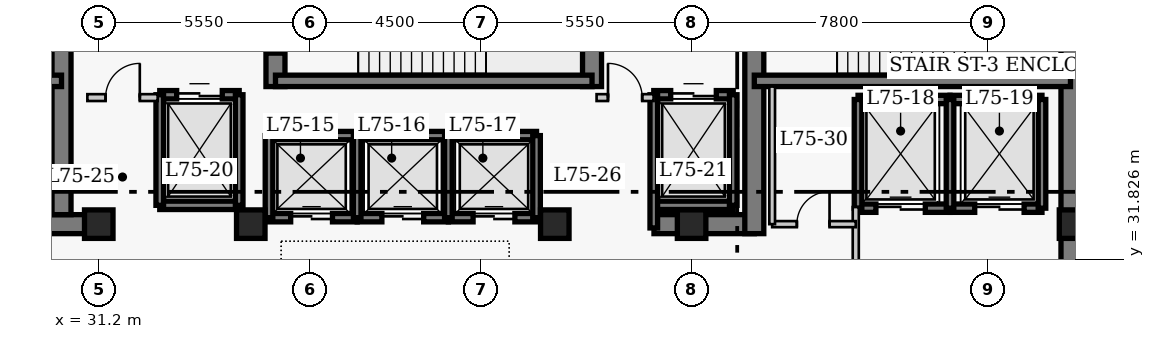
"""IFC4 building model, lengths in metres.
Left out: names, types, materials, properties, quantities, classifications, styles, units other than length and angle.
Written with IfcOpenShell. Run it as: python <this file> out.ifc"""

import sys

from ifc_helpers import new_model, si_unit, direction, frame, frame_2d, origin, origin_2d, place, context, subcontext, project, spatial, rectangle, extrude, element, fill, save


model = new_model("IFC4")
c1 = context("Model", 3, precision=1e-05, world=origin(), true_north=direction((0.0, 1.0)))
c2 = subcontext(c1, "Body", "Model", "MODEL_VIEW")
j1 = project(units=[si_unit("LENGTHUNIT", "METRE"), si_unit("PLANEANGLEUNIT", "RADIAN")], contexts=[c1])
p1 = place(None, origin())
s1 = spatial("IfcSite", under=j1, at=p1, CompositionType="ELEMENT")
p2 = place(p1, origin())
s2 = spatial("IfcBuilding", under=s1, at=p2, CompositionType="ELEMENT")
p3 = place(p2, frame((0.0, 0.0, 302.0)))
s3 = spatial("IfcBuildingStorey", under=s2, at=p3, CompositionType="ELEMENT", Elevation=302.0)
p4 = place(p3, frame((56.77, 27.05, 0.0), z_axis=(0.0, 0.0, 1.0), x_axis=(0.0, 1.0, 0.0)))
e1 = element("IfcWall", 1, at=p4, inside=s3, PredefinedType="SHEAR", context=c2, shape_type="SweptSolid", body=[
    extrude(rectangle(XDim=13.52, YDim=0.5, at=frame_2d((6.76, 0.0))), origin(), (0.0, 0.0, 1.0), 4.6),
])
p5 = place(p3, frame((28.45, 32.75, 0.0), z_axis=(0.0, 0.0, 1.0), x_axis=(1.0, 0.0, 0.0)))
e2 = element("IfcWall", 2, at=p5, inside=s3, PredefinedType="SHEAR", context=c2, shape_type="SweptSolid", body=[
    extrude(rectangle(XDim=2.4, YDim=0.5, at=frame_2d((1.2, 0.0))), origin(), (0.0, 0.0, 1.0), 4.6),
])
p6 = place(p3, frame((45.81, 32.75, 0.0), z_axis=(0.0, 0.0, 1.0), x_axis=(1.0, 0.0, 0.0)))
e3 = element("IfcWall", 3, at=p6, inside=s3, PredefinedType="SHEAR", context=c2, shape_type="SweptSolid", body=[
    extrude(rectangle(XDim=2.64, YDim=0.5, at=frame_2d((1.32, 0.0))), origin(), (0.0, 0.0, 1.0), 4.6),
])
p7 = place(p3, frame((30.22, 33.0, 0.0), z_axis=(0.0, 0.0, 1.0), x_axis=(0.0, 1.0, 0.0)))
e4 = element("IfcWall", 4, at=p7, inside=s3, PredefinedType="SHEAR", context=c2, shape_type="SweptSolid", body=[
    extrude(rectangle(XDim=7.32, YDim=0.5, at=frame_2d((3.66, 0.0))), origin(), (0.0, 0.0, 1.0), 4.6),
])
p8 = place(p3, frame((35.85, 36.37, 0.0), z_axis=(0.0, 0.0, 1.0), x_axis=(0.0, 1.0, 0.0)))
e5 = element("IfcWall", 5, at=p8, inside=s3, PredefinedType="SHEAR", context=c2, shape_type="SweptSolid", body=[
    extrude(rectangle(XDim=3.95, YDim=0.5, at=frame_2d((1.975, 0.0))), origin(), (0.0, 0.0, 1.0), 4.6),
])
p9 = place(p8, frame((0.88, 0.0, 0.0)))
e6 = element("IfcOpeningElement", 6, at=p9, cuts=e5, PredefinedType="OPENING", context=c2, shape_type="SweptSolid", body=[
    extrude(rectangle(XDim=1.1, YDim=2.15, at=frame_2d((0.55, 1.075))), frame((0.0, 0.26, 0.0), z_axis=(0.0, -1.0, 0.0), x_axis=(1.0, 0.0, 0.0)), (0.0, 0.0, 1.0), 0.52),
])
p10 = place(p3, frame((44.18, 36.37, 0.0), z_axis=(0.0, 0.0, 1.0), x_axis=(0.0, 1.0, 0.0)))
e7 = element("IfcWall", 7, at=p10, inside=s3, PredefinedType="SHEAR", context=c2, shape_type="SweptSolid", body=[
    extrude(rectangle(XDim=3.95, YDim=0.5, at=frame_2d((1.975, 0.0))), origin(), (0.0, 0.0, 1.0), 4.6),
])
p11 = place(p3, frame((48.45, 32.5, 0.0), z_axis=(0.0, 0.0, 1.0), x_axis=(0.0, 1.0, 0.0)))
e8 = element("IfcWall", 8, at=p11, inside=s3, PredefinedType="SHEAR", context=c2, shape_type="SweptSolid", body=[
    extrude(rectangle(XDim=7.82, YDim=0.5, at=frame_2d((3.91, 0.0))), origin(), (0.0, 0.0, 1.0), 4.6),
])
p12 = place(p11, frame((5.7, 0.0, 0.0)))
e9 = element("IfcOpeningElement", 9, at=p12, cuts=e8, PredefinedType="OPENING", context=c2, shape_type="SweptSolid", body=[
    extrude(rectangle(XDim=1.1, YDim=2.15, at=frame_2d((0.55, 1.075))), frame((0.0, 0.26, 0.0), z_axis=(0.0, -1.0, 0.0), x_axis=(1.0, 0.0, 0.0)), (0.0, 0.0, 1.0), 0.52),
])
p13 = place(p3, frame((21.9, 36.52, 0.0), z_axis=(0.0, 0.0, 1.0), x_axis=(1.0, 0.0, 0.0)))
e10 = element("IfcWall", 10, at=p13, inside=s3, PredefinedType="SHEAR", context=c2, shape_type="SweptSolid", body=[
    extrude(rectangle(XDim=8.32, YDim=0.3, at=frame_2d((4.16, 0.0))), origin(), (0.0, 0.0, 1.0), 4.6),
])
p14 = place(p13, frame((0.9, 0.0, 0.0)))
e11 = element("IfcOpeningElement", 11, at=p14, cuts=e10, PredefinedType="OPENING", context=c2, shape_type="SweptSolid", body=[
    extrude(rectangle(XDim=1.1, YDim=2.15, at=frame_2d((0.55, 1.075))), frame((0.0, 0.16, 0.0), z_axis=(0.0, -1.0, 0.0), x_axis=(1.0, 0.0, 0.0)), (0.0, 0.0, 1.0), 0.32),
])
p15 = place(p3, frame((35.85, 36.52, 0.0), z_axis=(0.0, 0.0, 1.0), x_axis=(1.0, 0.0, 0.0)))
e12 = element("IfcWall", 12, at=p15, inside=s3, PredefinedType="SHEAR", context=c2, shape_type="SweptSolid", body=[
    extrude(rectangle(XDim=8.33, YDim=0.3, at=frame_2d((4.165, 0.0))), origin(), (0.0, 0.0, 1.0), 4.6),
])
p16 = place(p3, frame((48.45, 36.52, 0.0), z_axis=(0.0, 0.0, 1.0), x_axis=(1.0, 0.0, 0.0)))
e13 = element("IfcWall", 13, at=p16, inside=s3, PredefinedType="SHEAR", context=c2, shape_type="SweptSolid", body=[
    extrude(rectangle(XDim=8.32, YDim=0.3, at=frame_2d((4.16, 0.0))), origin(), (0.0, 0.0, 1.0), 4.6),
])
for number, where, z_axis, x_axis in (
    (14, (31.2, 32.75, 0.0), (0.0, 0.0, 1.0), (1.0, 0.0, 0.0)),
    (15, (35.2, 32.75, 0.0), (0.0, 0.0, 1.0), (1.0, 0.0, 0.0)),
    (16, (43.2, 32.75, 0.0), (0.0, 0.0, 1.0), (1.0, 0.0, 0.0)),
    (17, (46.8, 32.75, 0.0), (0.0, 0.0, 1.0), (1.0, 0.0, 0.0)),
    (18, (56.85, 32.75, 0.0), (0.0, 0.0, 1.0), (1.0, 0.0, 0.0)),
):
    element("IfcColumn", number, at=place(p3, frame(where, z_axis=z_axis, x_axis=x_axis)), inside=s3, PredefinedType="COLUMN", context=c2, shape_type="SweptSolid", body=[
        extrude(rectangle(XDim=0.75, YDim=0.75, at=origin_2d()), origin(), (0.0, 0.0, 1.0), 4.6),
    ])
p17 = place(p3, frame((35.68, 35.08, 0.0), z_axis=(0.0, 0.0, 1.0), x_axis=(1.0, 0.0, 0.0)))
e19 = element("IfcWall", 19, at=p17, inside=s3, PredefinedType="SHEAR", context=c2, shape_type="SweptSolid", body=[
    extrude(rectangle(XDim=2.32, YDim=0.22, at=frame_2d((1.16, 0.0))), origin(), (0.0, 0.0, 1.0), 4.6),
])
p18 = place(p3, frame((35.68, 32.92, 0.0), z_axis=(0.0, 0.0, 1.0), x_axis=(1.0, 0.0, 0.0)))
e20 = element("IfcWall", 20, at=p18, inside=s3, PredefinedType="SHEAR", context=c2, shape_type="SweptSolid", body=[
    extrude(rectangle(XDim=2.32, YDim=0.22, at=frame_2d((1.16, 0.0))), origin(), (0.0, 0.0, 1.0), 4.6),
])
p19 = place(p18, frame((0.57, 0.0, 0.0)))
e21 = element("IfcOpeningElement", 21, at=p19, cuts=e20, PredefinedType="OPENING", context=c2, shape_type="SweptSolid", body=[
    extrude(rectangle(XDim=1.1, YDim=2.15, at=frame_2d((0.55, 1.075))), frame((0.0, 0.12, 0.0), z_axis=(0.0, -1.0, 0.0), x_axis=(1.0, 0.0, 0.0)), (0.0, 0.0, 1.0), 0.24),
])
p20 = place(p3, frame((35.68, 32.92, 0.0), z_axis=(0.0, 0.0, 1.0), x_axis=(0.0, 1.0, 0.0)))
e22 = element("IfcWall", 22, at=p20, inside=s3, PredefinedType="SHEAR", context=c2, shape_type="SweptSolid", body=[
    extrude(rectangle(XDim=2.16, YDim=0.2, at=frame_2d((1.08, 0.0))), origin(), (0.0, 0.0, 1.0), 4.6),
])
p21 = place(p3, frame((38.0, 35.08, 0.0), z_axis=(0.0, 0.0, 1.0), x_axis=(1.0, 0.0, 0.0)))
e23 = element("IfcWall", 23, at=p21, inside=s3, PredefinedType="SHEAR", context=c2, shape_type="SweptSolid", body=[
    extrude(rectangle(XDim=2.4, YDim=0.22, at=frame_2d((1.2, 0.0))), origin(), (0.0, 0.0, 1.0), 4.6),
])
p22 = place(p3, frame((38.0, 32.92, 0.0), z_axis=(0.0, 0.0, 1.0), x_axis=(1.0, 0.0, 0.0)))
e24 = element("IfcWall", 24, at=p22, inside=s3, PredefinedType="SHEAR", context=c2, shape_type="SweptSolid", body=[
    extrude(rectangle(XDim=2.4, YDim=0.22, at=frame_2d((1.2, 0.0))), origin(), (0.0, 0.0, 1.0), 4.6),
])
p23 = place(p22, frame((0.65, 0.0, 0.0)))
e25 = element("IfcOpeningElement", 25, at=p23, cuts=e24, PredefinedType="OPENING", context=c2, shape_type="SweptSolid", body=[
    extrude(rectangle(XDim=1.1, YDim=2.15, at=frame_2d((0.55, 1.075))), frame((0.0, 0.12, 0.0), z_axis=(0.0, -1.0, 0.0), x_axis=(1.0, 0.0, 0.0)), (0.0, 0.0, 1.0), 0.24),
])
p24 = place(p3, frame((38.0, 32.92, 0.0), z_axis=(0.0, 0.0, 1.0), x_axis=(0.0, 1.0, 0.0)))
e26 = element("IfcWall", 26, at=p24, inside=s3, PredefinedType="SHEAR", context=c2, shape_type="SweptSolid", body=[
    extrude(rectangle(XDim=2.16, YDim=0.2, at=frame_2d((1.08, 0.0))), origin(), (0.0, 0.0, 1.0), 4.6),
])
p25 = place(p3, frame((40.4, 35.08, 0.0), z_axis=(0.0, 0.0, 1.0), x_axis=(1.0, 0.0, 0.0)))
e27 = element("IfcWall", 27, at=p25, inside=s3, PredefinedType="SHEAR", context=c2, shape_type="SweptSolid", body=[
    extrude(rectangle(XDim=2.32, YDim=0.22, at=frame_2d((1.16, 0.0))), origin(), (0.0, 0.0, 1.0), 4.6),
])
p26 = place(p3, frame((40.4, 32.92, 0.0), z_axis=(0.0, 0.0, 1.0), x_axis=(1.0, 0.0, 0.0)))
e28 = element("IfcWall", 28, at=p26, inside=s3, PredefinedType="SHEAR", context=c2, shape_type="SweptSolid", body=[
    extrude(rectangle(XDim=2.32, YDim=0.22, at=frame_2d((1.16, 0.0))), origin(), (0.0, 0.0, 1.0), 4.6),
])
p27 = place(p26, frame((0.65, 0.0, 0.0)))
e29 = element("IfcOpeningElement", 29, at=p27, cuts=e28, PredefinedType="OPENING", context=c2, shape_type="SweptSolid", body=[
    extrude(rectangle(XDim=1.1, YDim=2.15, at=frame_2d((0.55, 1.075))), frame((0.0, 0.12, 0.0), z_axis=(0.0, -1.0, 0.0), x_axis=(1.0, 0.0, 0.0)), (0.0, 0.0, 1.0), 0.24),
])
for number, where, z_axis, x_axis in (
    (30, (40.4, 32.92, 0.0), (0.0, 0.0, 1.0), (0.0, 1.0, 0.0)),
    (31, (42.72, 32.92, 0.0), (0.0, 0.0, 1.0), (0.0, 1.0, 0.0)),
):
    element("IfcWall", number, at=place(p3, frame(where, z_axis=z_axis, x_axis=x_axis)), inside=s3, PredefinedType="SHEAR", context=c2, shape_type="SweptSolid", body=[
        extrude(rectangle(XDim=2.16, YDim=0.2, at=frame_2d((1.08, 0.0))), origin(), (0.0, 0.0, 1.0), 4.6),
    ])
p28 = place(p3, frame((51.18, 36.03, 0.0), z_axis=(0.0, 0.0, 1.0), x_axis=(1.0, 0.0, 0.0)))
e32 = element("IfcWall", 32, at=p28, inside=s3, PredefinedType="SHEAR", context=c2, shape_type="SweptSolid", body=[
    extrude(rectangle(XDim=2.42, YDim=0.22, at=frame_2d((1.21, 0.0))), origin(), (0.0, 0.0, 1.0), 4.6),
])
p29 = place(p3, frame((51.18, 33.17, 0.0), z_axis=(0.0, 0.0, 1.0), x_axis=(1.0, 0.0, 0.0)))
e33 = element("IfcWall", 33, at=p29, inside=s3, PredefinedType="SHEAR", context=c2, shape_type="SweptSolid", body=[
    extrude(rectangle(XDim=2.42, YDim=0.22, at=frame_2d((1.21, 0.0))), origin(), (0.0, 0.0, 1.0), 4.6),
])
p30 = place(p29, frame((0.47, 0.0, 0.0)))
e34 = element("IfcOpeningElement", 34, at=p30, cuts=e33, PredefinedType="OPENING", context=c2, shape_type="SweptSolid", body=[
    extrude(rectangle(XDim=1.3, YDim=2.15, at=frame_2d((0.65, 1.075))), frame((0.0, 0.12, 0.0), z_axis=(0.0, -1.0, 0.0), x_axis=(1.0, 0.0, 0.0)), (0.0, 0.0, 1.0), 0.24),
])
p31 = place(p3, frame((51.18, 33.17, 0.0), z_axis=(0.0, 0.0, 1.0), x_axis=(0.0, 1.0, 0.0)))
e35 = element("IfcWall", 35, at=p31, inside=s3, PredefinedType="SHEAR", context=c2, shape_type="SweptSolid", body=[
    extrude(rectangle(XDim=2.86, YDim=0.2, at=frame_2d((1.43, 0.0))), origin(), (0.0, 0.0, 1.0), 4.6),
])
p32 = place(p3, frame((53.6, 36.03, 0.0), z_axis=(0.0, 0.0, 1.0), x_axis=(1.0, 0.0, 0.0)))
e36 = element("IfcWall", 36, at=p32, inside=s3, PredefinedType="SHEAR", context=c2, shape_type="SweptSolid", body=[
    extrude(rectangle(XDim=2.42, YDim=0.22, at=frame_2d((1.21, 0.0))), origin(), (0.0, 0.0, 1.0), 4.6),
])
p33 = place(p3, frame((53.6, 33.17, 0.0), z_axis=(0.0, 0.0, 1.0), x_axis=(1.0, 0.0, 0.0)))
e37 = element("IfcWall", 37, at=p33, inside=s3, PredefinedType="SHEAR", context=c2, shape_type="SweptSolid", body=[
    extrude(rectangle(XDim=2.42, YDim=0.22, at=frame_2d((1.21, 0.0))), origin(), (0.0, 0.0, 1.0), 4.6),
])
p34 = place(p33, frame((0.65, 0.0, 0.0)))
e38 = element("IfcOpeningElement", 38, at=p34, cuts=e37, PredefinedType="OPENING", context=c2, shape_type="SweptSolid", body=[
    extrude(rectangle(XDim=1.3, YDim=2.15, at=frame_2d((0.65, 1.075))), frame((0.0, 0.12, 0.0), z_axis=(0.0, -1.0, 0.0), x_axis=(1.0, 0.0, 0.0)), (0.0, 0.0, 1.0), 0.24),
])
for number, where, z_axis, x_axis in (
    (39, (53.6, 33.17, 0.0), (0.0, 0.0, 1.0), (0.0, 1.0, 0.0)),
    (40, (56.02, 33.17, 0.0), (0.0, 0.0, 1.0), (0.0, 1.0, 0.0)),
):
    element("IfcWall", number, at=place(p3, frame(where, z_axis=z_axis, x_axis=x_axis)), inside=s3, PredefinedType="SHEAR", context=c2, shape_type="SweptSolid", body=[
        extrude(rectangle(XDim=2.86, YDim=0.2, at=frame_2d((1.43, 0.0))), origin(), (0.0, 0.0, 1.0), 4.6),
    ])
p35 = place(p3, frame((32.805, 36.155, 0.0), z_axis=(0.0, 0.0, 1.0), x_axis=(1.0, 0.0, 0.0)))
e41 = element("IfcWall", 41, at=p35, inside=s3, PredefinedType="SHEAR", context=c2, shape_type="SweptSolid", body=[
    extrude(rectangle(XDim=2.09, YDim=0.22, at=frame_2d((1.045, 0.0))), origin(), (0.0, 0.0, 1.0), 4.6),
])
p36 = place(p35, frame((0.445, 0.0, 0.0)))
e42 = element("IfcOpeningElement", 42, at=p36, cuts=e41, PredefinedType="OPENING", context=c2, shape_type="SweptSolid", body=[
    extrude(rectangle(XDim=1.2, YDim=2.15, at=frame_2d((0.6, 1.075))), frame((0.0, 0.12, 0.0), z_axis=(0.0, -1.0, 0.0), x_axis=(1.0, 0.0, 0.0)), (0.0, 0.0, 1.0), 0.24),
])
p37 = place(p3, frame((32.805, 33.245, 0.0), z_axis=(0.0, 0.0, 1.0), x_axis=(1.0, 0.0, 0.0)))
e43 = element("IfcWall", 43, at=p37, inside=s3, PredefinedType="SHEAR", context=c2, shape_type="SweptSolid", body=[
    extrude(rectangle(XDim=2.09, YDim=0.22, at=frame_2d((1.045, 0.0))), origin(), (0.0, 0.0, 1.0), 4.6),
])
for number, where, z_axis, x_axis in (
    (44, (32.805, 33.245, 0.0), (0.0, 0.0, 1.0), (0.0, 1.0, 0.0)),
    (45, (34.895, 33.245, 0.0), (0.0, 0.0, 1.0), (0.0, 1.0, 0.0)),
):
    element("IfcWall", number, at=place(p3, frame(where, z_axis=z_axis, x_axis=x_axis)), inside=s3, PredefinedType="SHEAR", context=c2, shape_type="SweptSolid", body=[
        extrude(rectangle(XDim=2.91, YDim=0.2, at=frame_2d((1.455, 0.0))), origin(), (0.0, 0.0, 1.0), 4.6),
    ])
p38 = place(p3, frame((45.805, 36.155, 0.0), z_axis=(0.0, 0.0, 1.0), x_axis=(1.0, 0.0, 0.0)))
e46 = element("IfcWall", 46, at=p38, inside=s3, PredefinedType="SHEAR", context=c2, shape_type="SweptSolid", body=[
    extrude(rectangle(XDim=2.09, YDim=0.22, at=frame_2d((1.045, 0.0))), origin(), (0.0, 0.0, 1.0), 4.6),
])
p39 = place(p38, frame((0.445, 0.0, 0.0)))
e47 = element("IfcOpeningElement", 47, at=p39, cuts=e46, PredefinedType="OPENING", context=c2, shape_type="SweptSolid", body=[
    extrude(rectangle(XDim=1.2, YDim=2.15, at=frame_2d((0.6, 1.075))), frame((0.0, 0.12, 0.0), z_axis=(0.0, -1.0, 0.0), x_axis=(1.0, 0.0, 0.0)), (0.0, 0.0, 1.0), 0.24),
])
p40 = place(p3, frame((45.805, 33.245, 0.0), z_axis=(0.0, 0.0, 1.0), x_axis=(1.0, 0.0, 0.0)))
e48 = element("IfcWall", 48, at=p40, inside=s3, PredefinedType="SHEAR", context=c2, shape_type="SweptSolid", body=[
    extrude(rectangle(XDim=2.09, YDim=0.22, at=frame_2d((1.045, 0.0))), origin(), (0.0, 0.0, 1.0), 4.6),
])
p41 = place(p3, frame((45.805, 32.65, 0.0), z_axis=(0.0, 0.0, 1.0), x_axis=(0.0, 1.0, 0.0)))
e49 = element("IfcWall", 49, at=p41, inside=s3, PredefinedType="SHEAR", context=c2, shape_type="SweptSolid", body=[
    extrude(rectangle(XDim=3.505, YDim=0.2, at=frame_2d((1.752, 0.0))), origin(), (0.0, 0.0, 1.0), 4.6),
])
p42 = place(p3, frame((47.895, 33.245, 0.0), z_axis=(0.0, 0.0, 1.0), x_axis=(0.0, 1.0, 0.0)))
e50 = element("IfcWall", 50, at=p42, inside=s3, PredefinedType="SHEAR", context=c2, shape_type="SweptSolid", body=[
    extrude(rectangle(XDim=2.91, YDim=0.2, at=frame_2d((1.455, 0.0))), origin(), (0.0, 0.0, 1.0), 4.6),
])
p43 = place(p3, frame((30.9, 36.08, 0.0), z_axis=(0.0, 0.0, 1.0), x_axis=(1.0, 0.0, 0.0)))
e51 = element("IfcWall", 51, at=p43, inside=s3, PredefinedType="PARTITIONING", context=c2, shape_type="SweptSolid", body=[
    extrude(rectangle(XDim=1.85, YDim=0.18, at=frame_2d((0.925, 0.0))), origin(), (0.0, 0.0, 1.0), 4.31),
])
p44 = place(p43, frame((0.48, 0.0, 0.0)))
e52 = element("IfcOpeningElement", 52, at=p44, cuts=e51, PredefinedType="OPENING", context=c2, shape_type="SweptSolid", body=[
    extrude(rectangle(XDim=0.9, YDim=2.15, at=frame_2d((0.45, 1.075))), frame((0.0, 0.1, 0.0), z_axis=(0.0, -1.0, 0.0), x_axis=(1.0, 0.0, 0.0)), (0.0, 0.0, 1.0), 0.2),
])
p45 = place(p3, frame((44.3, 36.08, 0.0), z_axis=(0.0, 0.0, 1.0), x_axis=(1.0, 0.0, 0.0)))
e53 = element("IfcWall", 53, at=p45, inside=s3, PredefinedType="PARTITIONING", context=c2, shape_type="SweptSolid", body=[
    extrude(rectangle(XDim=1.5, YDim=0.18, at=frame_2d((0.75, 0.0))), origin(), (0.0, 0.0, 1.0), 4.31),
])
p46 = place(p45, frame((0.3, 0.0, 0.0)))
e54 = element("IfcOpeningElement", 54, at=p46, cuts=e53, PredefinedType="OPENING", context=c2, shape_type="SweptSolid", body=[
    extrude(rectangle(XDim=0.9, YDim=2.15, at=frame_2d((0.45, 1.075))), frame((0.0, 0.1, 0.0), z_axis=(0.0, -1.0, 0.0), x_axis=(1.0, 0.0, 0.0)), (0.0, 0.0, 1.0), 0.2),
])
p47 = place(p3, frame((51.12, 29.5, 0.0), z_axis=(0.0, 0.0, 1.0), x_axis=(0.0, 1.0, 0.0)))
e55 = element("IfcWall", 55, at=p47, inside=s3, PredefinedType="PARTITIONING", context=c2, shape_type="SweptSolid", body=[
    extrude(rectangle(XDim=3.7, YDim=0.16, at=frame_2d((1.85, 0.0))), origin(), (0.0, 0.0, 1.0), 4.31),
])
p48 = place(p47, frame((0.9, 0.0, 0.0)))
e56 = element("IfcOpeningElement", 56, at=p48, cuts=e55, PredefinedType="OPENING", context=c2, shape_type="SweptSolid", body=[
    extrude(rectangle(XDim=1.1, YDim=2.15, at=frame_2d((0.55, 1.075))), frame((0.0, 0.09, 0.0), z_axis=(0.0, -1.0, 0.0), x_axis=(1.0, 0.0, 0.0)), (0.0, 0.0, 1.0), 0.18),
])
p49 = place(p3, frame((48.92, 32.75, 0.0), z_axis=(0.0, 0.0, 1.0), x_axis=(1.0, 0.0, 0.0)))
e57 = element("IfcWall", 57, at=p49, inside=s3, PredefinedType="PARTITIONING", context=c2, shape_type="SweptSolid", body=[
    extrude(rectangle(XDim=2.2, YDim=0.16, at=frame_2d((1.1, 0.0))), origin(), (0.0, 0.0, 1.0), 4.31),
])
p50 = place(p49, frame((0.65, 0.0, 0.0)))
e58 = element("IfcOpeningElement", 58, at=p50, cuts=e57, PredefinedType="OPENING", context=c2, shape_type="SweptSolid", body=[
    extrude(rectangle(XDim=0.86, YDim=2.05, at=frame_2d((0.43, 1.025))), frame((0.0, 0.09, 0.0), z_axis=(0.0, -1.0, 0.0), x_axis=(1.0, 0.0, 0.0)), (0.0, 0.0, 1.0), 0.18),
])
p51 = place(p3, frame((48.92, 32.75, 0.0), z_axis=(0.0, 0.0, 1.0), x_axis=(0.0, 1.0, 0.0)))
e59 = element("IfcWall", 59, at=p51, inside=s3, PredefinedType="PARTITIONING", context=c2, shape_type="SweptSolid", body=[
    extrude(rectangle(XDim=3.62, YDim=0.15, at=frame_2d((1.81, 0.0))), origin(), (0.0, 0.0, 1.0), 4.31),
])
p52 = place(p19, origin())
e60 = element("IfcDoor", 60, at=p52, inside=s3, OperationType="DOUBLE_DOOR_SLIDING", PredefinedType="DOOR", context=c2, shape_type="SweptSolid", body=[
    extrude(rectangle(XDim=1.1, YDim=2.15, at=frame_2d((0.55, 1.075))), frame((0.0, 0.025, 0.0), z_axis=(0.0, -1.0, 0.0), x_axis=(1.0, 0.0, 0.0)), (0.0, 0.0, 1.0), 0.05),
])
fill(e21, e60)
p53 = place(p23, origin())
e61 = element("IfcDoor", 61, at=p53, inside=s3, OperationType="DOUBLE_DOOR_SLIDING", PredefinedType="DOOR", context=c2, shape_type="SweptSolid", body=[
    extrude(rectangle(XDim=1.1, YDim=2.15, at=frame_2d((0.55, 1.075))), frame((0.0, 0.025, 0.0), z_axis=(0.0, -1.0, 0.0), x_axis=(1.0, 0.0, 0.0)), (0.0, 0.0, 1.0), 0.05),
])
fill(e25, e61)
p54 = place(p27, origin())
e62 = element("IfcDoor", 62, at=p54, inside=s3, OperationType="DOUBLE_DOOR_SLIDING", PredefinedType="DOOR", context=c2, shape_type="SweptSolid", body=[
    extrude(rectangle(XDim=1.1, YDim=2.15, at=frame_2d((0.55, 1.075))), frame((0.0, 0.025, 0.0), z_axis=(0.0, -1.0, 0.0), x_axis=(1.0, 0.0, 0.0)), (0.0, 0.0, 1.0), 0.05),
])
fill(e29, e62)
p55 = place(p30, origin())
e63 = element("IfcDoor", 63, at=p55, inside=s3, OperationType="DOUBLE_DOOR_SLIDING", PredefinedType="DOOR", context=c2, shape_type="SweptSolid", body=[
    extrude(rectangle(XDim=1.3, YDim=2.15, at=frame_2d((0.65, 1.075))), frame((0.0, 0.025, 0.0), z_axis=(0.0, -1.0, 0.0), x_axis=(1.0, 0.0, 0.0)), (0.0, 0.0, 1.0), 0.05),
])
fill(e34, e63)
p56 = place(p34, origin())
e64 = element("IfcDoor", 64, at=p56, inside=s3, OperationType="DOUBLE_DOOR_SLIDING", PredefinedType="DOOR", context=c2, shape_type="SweptSolid", body=[
    extrude(rectangle(XDim=1.3, YDim=2.15, at=frame_2d((0.65, 1.075))), frame((0.0, 0.025, 0.0), z_axis=(0.0, -1.0, 0.0), x_axis=(1.0, 0.0, 0.0)), (0.0, 0.0, 1.0), 0.05),
])
fill(e38, e64)
p57 = place(p36, origin())
e65 = element("IfcDoor", 65, at=p57, inside=s3, OperationType="DOUBLE_DOOR_SLIDING", PredefinedType="DOOR", context=c2, shape_type="SweptSolid", body=[
    extrude(rectangle(XDim=1.2, YDim=2.15, at=frame_2d((0.6, 1.075))), frame((0.0, 0.025, 0.0), z_axis=(0.0, -1.0, 0.0), x_axis=(1.0, 0.0, 0.0)), (0.0, 0.0, 1.0), 0.05),
])
fill(e42, e65)
p58 = place(p39, origin())
e66 = element("IfcDoor", 66, at=p58, inside=s3, OperationType="DOUBLE_DOOR_SLIDING", PredefinedType="DOOR", context=c2, shape_type="SweptSolid", body=[
    extrude(rectangle(XDim=1.2, YDim=2.15, at=frame_2d((0.6, 1.075))), frame((0.0, 0.025, 0.0), z_axis=(0.0, -1.0, 0.0), x_axis=(1.0, 0.0, 0.0)), (0.0, 0.0, 1.0), 0.05),
])
fill(e47, e66)
p59 = place(p44, origin())
e67 = element("IfcDoor", 67, at=p59, inside=s3, OperationType="SINGLE_SWING_RIGHT", PredefinedType="DOOR", context=c2, shape_type="SweptSolid", body=[
    extrude(rectangle(XDim=0.9, YDim=2.15, at=frame_2d((0.45, 1.075))), frame((0.0, 0.025, 0.0), z_axis=(0.0, -1.0, 0.0), x_axis=(1.0, 0.0, 0.0)), (0.0, 0.0, 1.0), 0.05),
])
fill(e52, e67)
p60 = place(p46, origin())
e68 = element("IfcDoor", 68, at=p60, inside=s3, OperationType="SINGLE_SWING_LEFT", PredefinedType="DOOR", context=c2, shape_type="SweptSolid", body=[
    extrude(rectangle(XDim=0.9, YDim=2.15, at=frame_2d((0.45, 1.075))), frame((0.0, 0.025, 0.0), z_axis=(0.0, -1.0, 0.0), x_axis=(1.0, 0.0, 0.0)), (0.0, 0.0, 1.0), 0.05),
])
fill(e54, e68)
p61 = place(p50, origin())
e69 = element("IfcDoor", 69, at=p61, inside=s3, OperationType="SINGLE_SWING_RIGHT", PredefinedType="DOOR", context=c2, shape_type="SweptSolid", body=[
    extrude(rectangle(XDim=0.86, YDim=2.05, at=frame_2d((0.43, 1.025))), frame((0.0, 0.025, 0.0), z_axis=(0.0, -1.0, 0.0), x_axis=(1.0, 0.0, 0.0)), (0.0, 0.0, 1.0), 0.05),
])
fill(e58, e69)
p62 = place(p9, origin())
e70 = element("IfcDoor", 70, at=p62, inside=s3, OperationType="SINGLE_SWING_RIGHT", PredefinedType="DOOR", context=c2, shape_type="SweptSolid", body=[
    extrude(rectangle(XDim=1.1, YDim=2.15, at=frame_2d((0.55, 1.075))), frame((0.0, 0.025, 0.0), z_axis=(0.0, -1.0, 0.0), x_axis=(1.0, 0.0, 0.0)), (0.0, 0.0, 1.0), 0.05),
])
fill(e6, e70)
save(model, sys.argv[1])
